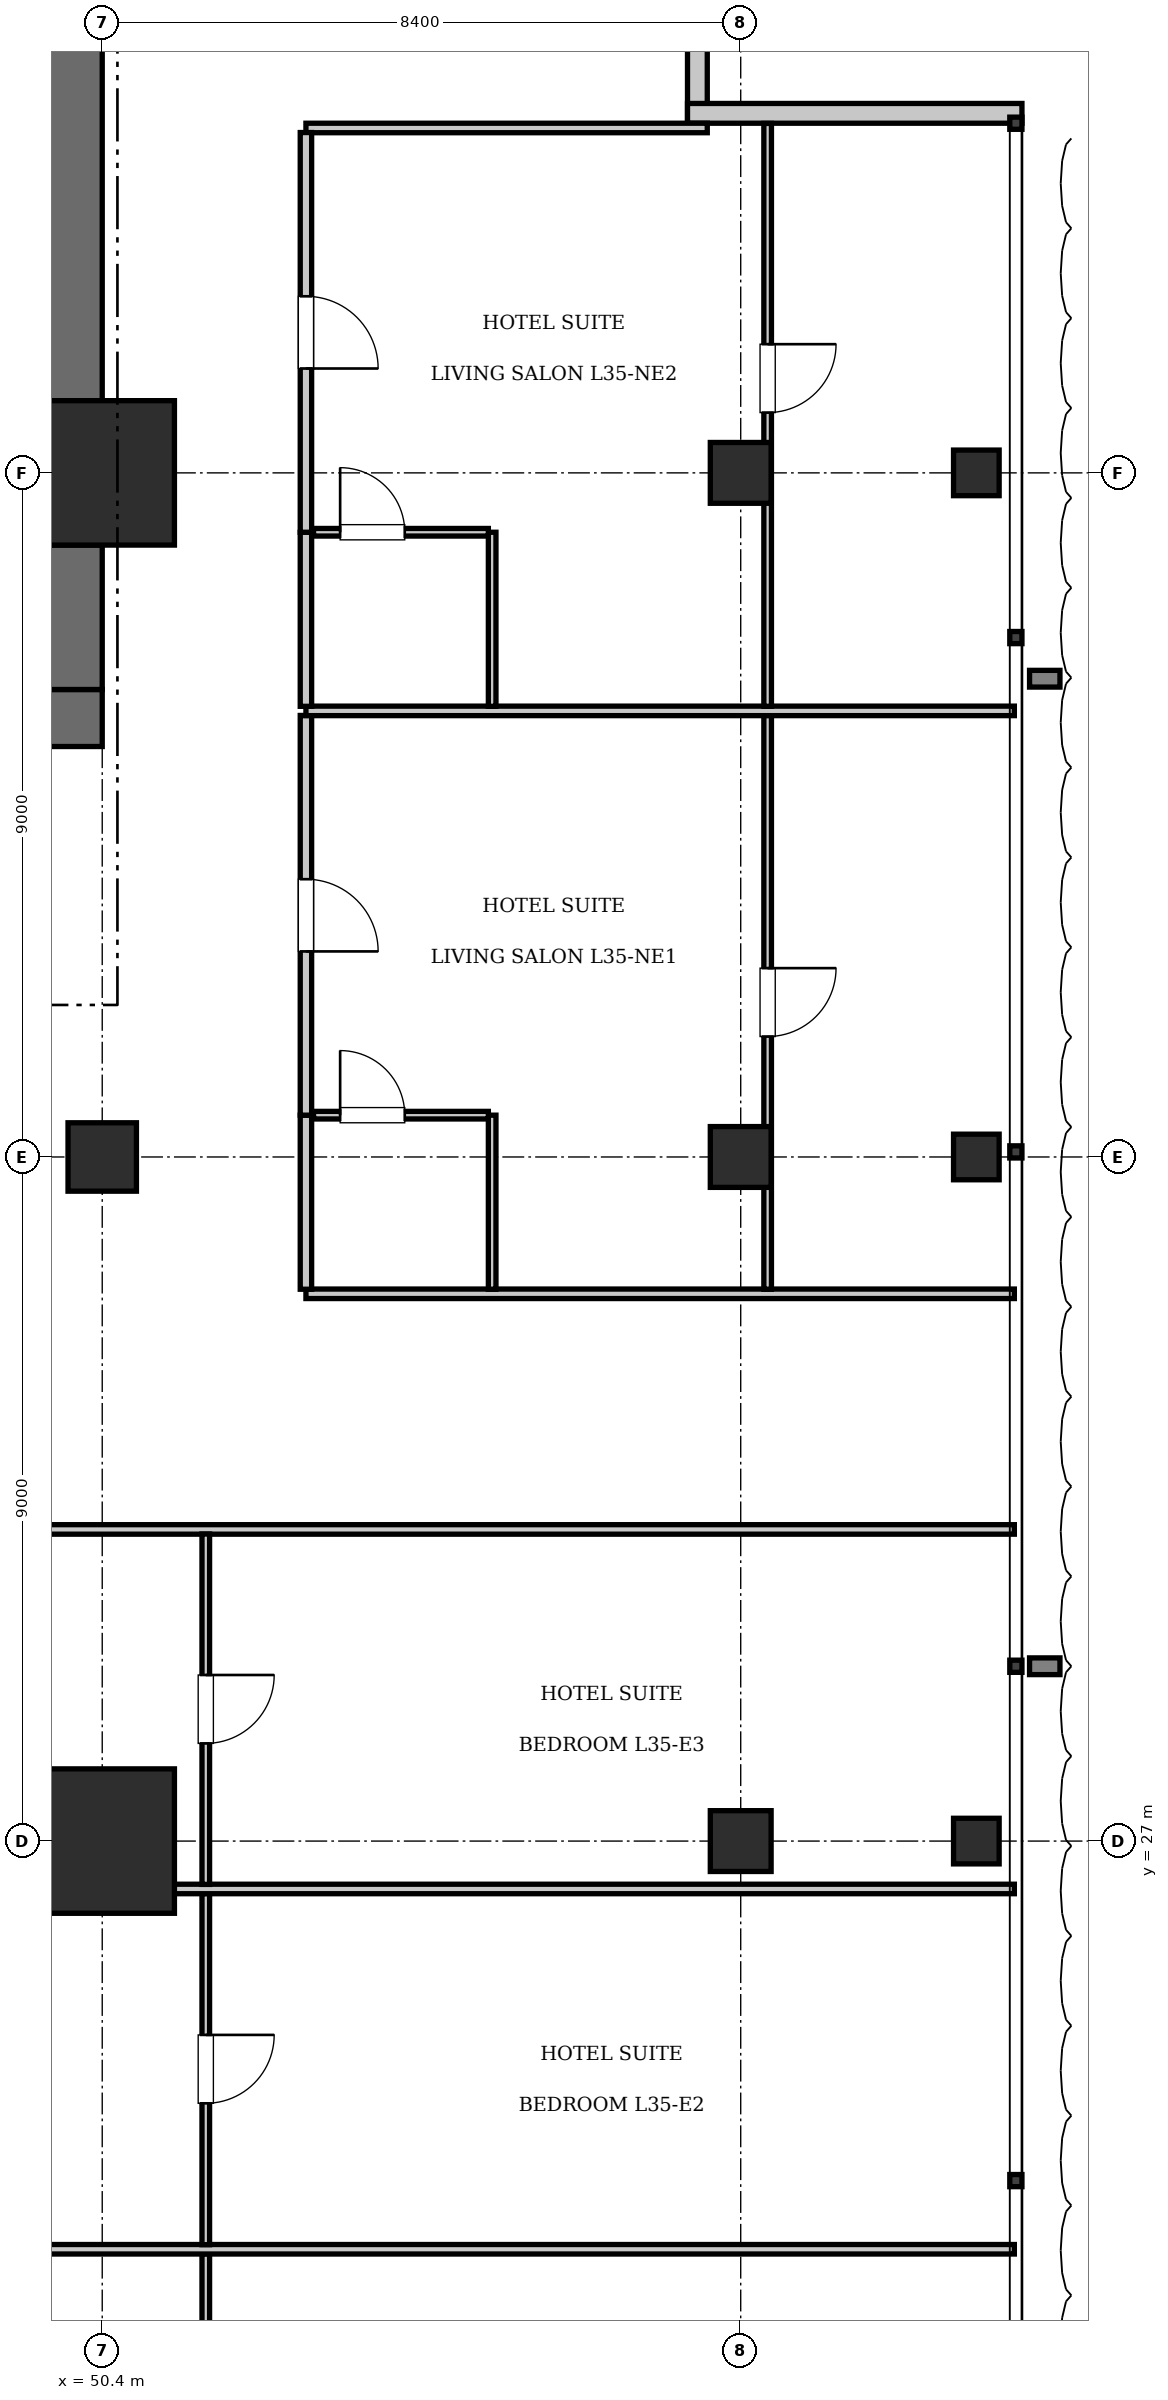
"""IFC4 building model, lengths in metres.
Left out: names, types, materials, properties, quantities, classifications, styles, units other than length and angle.
Written with IfcOpenShell. Run it as: python <this file> out.ifc"""

import sys

from ifc_helpers import new_model, si_unit, direction, frame, frame_2d, origin, origin_2d, place, context, subcontext, project, spatial, rectangle, i_section, extrude, element, fill, save


model = new_model("IFC4")
c1 = context("Model", 3, precision=1e-05, world=origin(), true_north=direction((0.0, 1.0)))
c2 = subcontext(c1, "Body", "Model", "MODEL_VIEW")
j1 = project(units=[si_unit("LENGTHUNIT", "METRE"), si_unit("PLANEANGLEUNIT", "RADIAN")], contexts=[c1])
p1 = place(None, origin())
s1 = spatial("IfcSite", under=j1, at=p1, CompositionType="ELEMENT")
p2 = place(p1, origin())
s2 = spatial("IfcBuilding", under=s1, at=p2, CompositionType="ELEMENT")
p3 = place(p2, frame((0.0, 0.0, 146.65)))
s3 = spatial("IfcBuildingStorey", under=s2, at=p3, CompositionType="ELEMENT", Elevation=146.65)
for number, where, z_axis, x_axis in (
    (1, (50.4, 27.0, 0.0), (0.0, 0.0, 1.0), (1.0, 0.0, 0.0)),
    (2, (50.4, 45.0, 0.0), (0.0, 0.0, 1.0), (1.0, 0.0, 0.0)),
):
    element("IfcColumn", number, at=place(p3, frame(where, z_axis=z_axis, x_axis=x_axis)), inside=s3, PredefinedType="COLUMN", context=c2, shape_type="SweptSolid", body=[
        extrude(rectangle(XDim=1.9, YDim=1.9, at=origin_2d()), origin(), (0.0, 0.0, 1.0), 3.85),
    ])
p4 = place(p3, frame((43.6, 41.775, 0.0), z_axis=(0.0, 0.0, 1.0), x_axis=(1.0, 0.0, 0.0)))
e3 = element("IfcWall", 3, at=p4, inside=s3, PredefinedType="SHEAR", context=c2, shape_type="SweptSolid", body=[
    extrude(rectangle(XDim=6.8, YDim=0.75, at=frame_2d((3.4, 0.0))), origin(), (0.0, 0.0, 1.0), 3.85),
])
p5 = place(p4, frame((3.9, 0.0, 0.0)))
e4 = element("IfcOpeningElement", 4, at=p5, cuts=e3, PredefinedType="OPENING", context=c2, shape_type="SweptSolid", body=[
    extrude(rectangle(XDim=1.15, YDim=2.15, at=frame_2d((0.575, 1.075))), frame((0.0, 0.385, 0.0), z_axis=(0.0, -1.0, 0.0), x_axis=(1.0, 0.0, 0.0)), (0.0, 0.0, 1.0), 0.77),
])
p6 = place(p4, frame((0.55, 0.0, 0.0)))
e5 = element("IfcOpeningElement", 5, at=p6, cuts=e3, PredefinedType="OPENING", context=c2, shape_type="SweptSolid", body=[
    extrude(rectangle(XDim=1.1, YDim=2.2, at=frame_2d((0.55, 1.1))), frame((0.0, 0.385, 0.0), z_axis=(0.0, -1.0, 0.0), x_axis=(1.0, 0.0, 0.0)), (0.0, 0.0, 1.0), 0.77),
])
p7 = place(p3, frame((50.025, 42.15, 0.0), z_axis=(0.0, 0.0, 1.0), x_axis=(0.0, 1.0, 0.0)))
e6 = element("IfcWall", 6, at=p7, inside=s3, PredefinedType="SHEAR", context=c2, shape_type="SweptSolid", body=[
    extrude(rectangle(XDim=1.9, YDim=0.75, at=frame_2d((0.95, 0.0))), origin(), (0.0, 0.0, 1.0), 3.85),
])
p8 = place(p3, frame((50.025, 45.95, 0.0), z_axis=(0.0, 0.0, 1.0), x_axis=(0.0, 1.0, 0.0)))
e7 = element("IfcWall", 7, at=p8, inside=s3, PredefinedType="SHEAR", context=c2, shape_type="SweptSolid", body=[
    extrude(rectangle(XDim=7.3, YDim=0.75, at=frame_2d((3.65, 0.0))), origin(), (0.0, 0.0, 1.0), 3.85),
])
p9 = place(p3, frame((50.4, 36.0, 0.0), z_axis=(0.0, 0.0, 1.0), x_axis=(1.0, 0.0, 0.0)))
e8 = element("IfcColumn", 8, at=p9, inside=s3, PredefinedType="COLUMN", context=c2, shape_type="SweptSolid", body=[
    extrude(rectangle(XDim=0.9, YDim=0.9, at=origin_2d()), origin(), (0.0, 0.0, 1.0), 3.85),
])
for number, where, z_axis, x_axis in (
    (9, (58.8, 27.0, 0.0), (0.0, 0.0, 1.0), (1.0, 0.0, 0.0)),
    (10, (58.8, 36.0, 0.0), (0.0, 0.0, 1.0), (1.0, 0.0, 0.0)),
    (11, (58.8, 45.0, 0.0), (0.0, 0.0, 1.0), (1.0, 0.0, 0.0)),
):
    element("IfcColumn", number, at=place(p3, frame(where, z_axis=z_axis, x_axis=x_axis)), inside=s3, PredefinedType="COLUMN", context=c2, shape_type="SweptSolid", body=[
        extrude(rectangle(XDim=0.8, YDim=0.8, at=origin_2d()), origin(), (0.0, 0.0, 1.0), 3.85),
    ])
for number, where, z_axis, x_axis in (
    (12, (61.9, 27.0, 0.0), (0.0, 0.0, 1.0), (1.0, 0.0, 0.0)),
    (13, (61.9, 36.0, 0.0), (0.0, 0.0, 1.0), (1.0, 0.0, 0.0)),
    (14, (61.9, 45.0, 0.0), (0.0, 0.0, 1.0), (1.0, 0.0, 0.0)),
):
    element("IfcColumn", number, at=place(p3, frame(where, z_axis=z_axis, x_axis=x_axis)), inside=s3, PredefinedType="COLUMN", context=c2, shape_type="SweptSolid", body=[
        extrude(i_section(OverallWidth=0.6, OverallDepth=0.6, WebThickness=0.025, FlangeThickness=0.038, at=origin_2d()), origin(), (0.0, 0.0, 1.0), 3.85),
    ])
for number, where, z_axis, x_axis in (
    (15, (58.23, 54.0, 0.0), (0.0, 0.0, 1.0), (0.0, -1.0, 0.0)),
    (16, (58.1, 49.73, 0.0), (0.0, 0.0, 1.0), (1.0, 0.0, 0.0)),
):
    element("IfcWall", number, at=place(p3, frame(where, z_axis=z_axis, x_axis=x_axis)), inside=s3, PredefinedType="SOLIDWALL", context=c2, shape_type="SweptSolid", body=[
        extrude(rectangle(XDim=4.4, YDim=0.26, at=frame_2d((2.2, 0.0))), origin(), (0.0, 0.0, 1.0), 3.61),
    ])
p10 = place(p3, frame((37.68, 31.1, 0.0), z_axis=(0.0, 0.0, 1.0), x_axis=(1.0, 0.0, 0.0)))
e17 = element("IfcWall", 17, at=p10, inside=s3, PredefinedType="PARTITIONING", context=c2, shape_type="SweptSolid", body=[
    extrude(rectangle(XDim=24.72, YDim=0.125, at=frame_2d((12.36, 0.0))), origin(), (0.0, 0.0, 1.0), 3.61),
])
p11 = place(p3, frame((51.762, 16.96, 0.0), z_axis=(0.0, 0.0, 1.0), x_axis=(0.0, 1.0, 0.0)))
e18 = element("IfcWall", 18, at=p11, inside=s3, PredefinedType="PARTITIONING", context=c2, shape_type="SweptSolid", body=[
    extrude(rectangle(XDim=4.61, YDim=0.1, at=frame_2d((2.305, 0.0))), origin(), (0.0, 0.0, 1.0), 3.61),
])
p12 = place(p11, frame((1.855, 0.0, 0.0)))
e19 = element("IfcOpeningElement", 19, at=p12, cuts=e18, PredefinedType="OPENING", context=c2, shape_type="SweptSolid", body=[
    extrude(rectangle(XDim=0.9, YDim=2.1, at=frame_2d((0.45, 1.05))), frame((0.0, 0.06, 0.0), z_axis=(0.0, -1.0, 0.0), x_axis=(1.0, 0.0, 0.0)), (0.0, 0.0, 1.0), 0.12),
])
p13 = place(p3, frame((37.68, 21.63, 0.0), z_axis=(0.0, 0.0, 1.0), x_axis=(1.0, 0.0, 0.0)))
e20 = element("IfcWall", 20, at=p13, inside=s3, PredefinedType="PARTITIONING", context=c2, shape_type="SweptSolid", body=[
    extrude(rectangle(XDim=24.72, YDim=0.125, at=frame_2d((12.36, 0.0))), origin(), (0.0, 0.0, 1.0), 3.61),
])
p14 = place(p3, frame((51.762, 21.69, 0.0), z_axis=(0.0, 0.0, 1.0), x_axis=(0.0, 1.0, 0.0)))
e21 = element("IfcWall", 21, at=p14, inside=s3, PredefinedType="PARTITIONING", context=c2, shape_type="SweptSolid", body=[
    extrude(rectangle(XDim=4.62, YDim=0.1, at=frame_2d((2.31, 0.0))), origin(), (0.0, 0.0, 1.0), 3.61),
])
p15 = place(p14, frame((1.86, 0.0, 0.0)))
e22 = element("IfcOpeningElement", 22, at=p15, cuts=e21, PredefinedType="OPENING", context=c2, shape_type="SweptSolid", body=[
    extrude(rectangle(XDim=0.9, YDim=2.1, at=frame_2d((0.45, 1.05))), frame((0.0, 0.06, 0.0), z_axis=(0.0, -1.0, 0.0), x_axis=(1.0, 0.0, 0.0)), (0.0, 0.0, 1.0), 0.12),
])
p16 = place(p3, frame((37.68, 26.37, 0.0), z_axis=(0.0, 0.0, 1.0), x_axis=(1.0, 0.0, 0.0)))
e23 = element("IfcWall", 23, at=p16, inside=s3, PredefinedType="PARTITIONING", context=c2, shape_type="SweptSolid", body=[
    extrude(rectangle(XDim=24.72, YDim=0.125, at=frame_2d((12.36, 0.0))), origin(), (0.0, 0.0, 1.0), 3.61),
])
p17 = place(p3, frame((51.762, 26.43, 0.0), z_axis=(0.0, 0.0, 1.0), x_axis=(0.0, 1.0, 0.0)))
e24 = element("IfcWall", 24, at=p17, inside=s3, PredefinedType="PARTITIONING", context=c2, shape_type="SweptSolid", body=[
    extrude(rectangle(XDim=4.61, YDim=0.1, at=frame_2d((2.305, 0.0))), origin(), (0.0, 0.0, 1.0), 3.61),
])
p18 = place(p17, frame((1.855, 0.0, 0.0)))
e25 = element("IfcOpeningElement", 25, at=p18, cuts=e24, PredefinedType="OPENING", context=c2, shape_type="SweptSolid", body=[
    extrude(rectangle(XDim=0.9, YDim=2.1, at=frame_2d((0.45, 1.05))), frame((0.0, 0.06, 0.0), z_axis=(0.0, -1.0, 0.0), x_axis=(1.0, 0.0, 0.0)), (0.0, 0.0, 1.0), 0.12),
])
p19 = place(p3, frame((53.08, 34.2, 0.0), z_axis=(0.0, 0.0, 1.0), x_axis=(1.0, 0.0, 0.0)))
e26 = element("IfcWall", 26, at=p19, inside=s3, PredefinedType="PARTITIONING", context=c2, shape_type="SweptSolid", body=[
    extrude(rectangle(XDim=9.32, YDim=0.125, at=frame_2d((4.66, 0.0))), origin(), (0.0, 0.0, 1.0), 3.61),
])
p20 = place(p3, frame((53.08, 49.538, 0.0), z_axis=(0.0, 0.0, 1.0), x_axis=(1.0, 0.0, 0.0)))
e27 = element("IfcWall", 27, at=p20, inside=s3, PredefinedType="PARTITIONING", context=c2, shape_type="SweptSolid", body=[
    extrude(rectangle(XDim=5.28, YDim=0.125, at=frame_2d((2.64, 0.0))), origin(), (0.0, 0.0, 1.0), 3.61),
])
p21 = place(p3, frame((53.08, 34.26, 0.0), z_axis=(0.0, 0.0, 1.0), x_axis=(0.0, 1.0, 0.0)))
e28 = element("IfcWall", 28, at=p21, inside=s3, PredefinedType="PARTITIONING", context=c2, shape_type="SweptSolid", body=[
    extrude(rectangle(XDim=2.29, YDim=0.15, at=frame_2d((1.145, 0.0))), origin(), (0.0, 0.0, 1.0), 3.61),
])
p22 = place(p3, frame((53.08, 36.55, 0.0), z_axis=(0.0, 0.0, 1.0), x_axis=(0.0, 1.0, 0.0)))
e29 = element("IfcWall", 29, at=p22, inside=s3, PredefinedType="PARTITIONING", context=c2, shape_type="SweptSolid", body=[
    extrude(rectangle(XDim=5.259, YDim=0.15, at=frame_2d((2.629, 0.0))), origin(), (0.0, 0.0, 1.0), 3.61),
])
p23 = place(p22, frame((2.154, 0.0, 0.0)))
e30 = element("IfcOpeningElement", 30, at=p23, cuts=e29, PredefinedType="OPENING", context=c2, shape_type="SweptSolid", body=[
    extrude(rectangle(XDim=0.95, YDim=2.15, at=frame_2d((0.475, 1.075))), frame((0.0, 0.085, 0.0), z_axis=(0.0, -1.0, 0.0), x_axis=(1.0, 0.0, 0.0)), (0.0, 0.0, 1.0), 0.17),
])
p24 = place(p3, frame((55.53, 34.26, 0.0), z_axis=(0.0, 0.0, 1.0), x_axis=(0.0, 1.0, 0.0)))
e31 = element("IfcWall", 31, at=p24, inside=s3, PredefinedType="PARTITIONING", context=c2, shape_type="SweptSolid", body=[
    extrude(rectangle(XDim=2.29, YDim=0.1, at=frame_2d((1.145, 0.0))), origin(), (0.0, 0.0, 1.0), 3.61),
])
p25 = place(p3, frame((53.18, 36.55, 0.0), z_axis=(0.0, 0.0, 1.0), x_axis=(1.0, 0.0, 0.0)))
e32 = element("IfcWall", 32, at=p25, inside=s3, PredefinedType="PARTITIONING", context=c2, shape_type="SweptSolid", body=[
    extrude(rectangle(XDim=2.3, YDim=0.1, at=frame_2d((1.15, 0.0))), origin(), (0.0, 0.0, 1.0), 3.61),
])
p26 = place(p25, frame((0.35, 0.0, 0.0)))
e33 = element("IfcOpeningElement", 33, at=p26, cuts=e32, PredefinedType="OPENING", context=c2, shape_type="SweptSolid", body=[
    extrude(rectangle(XDim=0.85, YDim=2.1, at=frame_2d((0.425, 1.05))), frame((0.0, 0.06, 0.0), z_axis=(0.0, -1.0, 0.0), x_axis=(1.0, 0.0, 0.0)), (0.0, 0.0, 1.0), 0.12),
])
p27 = place(p3, frame((59.154, 34.26, 0.0), z_axis=(0.0, 0.0, 1.0), x_axis=(0.0, 1.0, 0.0)))
e34 = element("IfcWall", 34, at=p27, inside=s3, PredefinedType="PARTITIONING", context=c2, shape_type="SweptSolid", body=[
    extrude(rectangle(XDim=7.549, YDim=0.1, at=frame_2d((3.774, 0.0))), origin(), (0.0, 0.0, 1.0), 3.61),
])
p28 = place(p27, frame((3.324, 0.0, 0.0)))
e35 = element("IfcOpeningElement", 35, at=p28, cuts=e34, PredefinedType="OPENING", context=c2, shape_type="SweptSolid", body=[
    extrude(rectangle(XDim=0.9, YDim=2.1, at=frame_2d((0.45, 1.05))), frame((0.0, 0.06, 0.0), z_axis=(0.0, -1.0, 0.0), x_axis=(1.0, 0.0, 0.0)), (0.0, 0.0, 1.0), 0.12),
])
p29 = place(p3, frame((53.08, 41.869, 0.0), z_axis=(0.0, 0.0, 1.0), x_axis=(1.0, 0.0, 0.0)))
e36 = element("IfcWall", 36, at=p29, inside=s3, PredefinedType="PARTITIONING", context=c2, shape_type="SweptSolid", body=[
    extrude(rectangle(XDim=9.32, YDim=0.125, at=frame_2d((4.66, 0.0))), origin(), (0.0, 0.0, 1.0), 3.61),
])
p30 = place(p3, frame((53.08, 41.929, 0.0), z_axis=(0.0, 0.0, 1.0), x_axis=(0.0, 1.0, 0.0)))
e37 = element("IfcWall", 37, at=p30, inside=s3, PredefinedType="PARTITIONING", context=c2, shape_type="SweptSolid", body=[
    extrude(rectangle(XDim=2.29, YDim=0.15, at=frame_2d((1.145, 0.0))), origin(), (0.0, 0.0, 1.0), 3.61),
])
p31 = place(p3, frame((53.08, 44.219, 0.0), z_axis=(0.0, 0.0, 1.0), x_axis=(0.0, 1.0, 0.0)))
e38 = element("IfcWall", 38, at=p31, inside=s3, PredefinedType="PARTITIONING", context=c2, shape_type="SweptSolid", body=[
    extrude(rectangle(XDim=5.259, YDim=0.15, at=frame_2d((2.629, 0.0))), origin(), (0.0, 0.0, 1.0), 3.61),
])
p32 = place(p31, frame((2.154, 0.0, 0.0)))
e39 = element("IfcOpeningElement", 39, at=p32, cuts=e38, PredefinedType="OPENING", context=c2, shape_type="SweptSolid", body=[
    extrude(rectangle(XDim=0.95, YDim=2.15, at=frame_2d((0.475, 1.075))), frame((0.0, 0.085, 0.0), z_axis=(0.0, -1.0, 0.0), x_axis=(1.0, 0.0, 0.0)), (0.0, 0.0, 1.0), 0.17),
])
p33 = place(p3, frame((55.53, 41.929, 0.0), z_axis=(0.0, 0.0, 1.0), x_axis=(0.0, 1.0, 0.0)))
e40 = element("IfcWall", 40, at=p33, inside=s3, PredefinedType="PARTITIONING", context=c2, shape_type="SweptSolid", body=[
    extrude(rectangle(XDim=2.29, YDim=0.1, at=frame_2d((1.145, 0.0))), origin(), (0.0, 0.0, 1.0), 3.61),
])
p34 = place(p3, frame((53.18, 44.219, 0.0), z_axis=(0.0, 0.0, 1.0), x_axis=(1.0, 0.0, 0.0)))
e41 = element("IfcWall", 41, at=p34, inside=s3, PredefinedType="PARTITIONING", context=c2, shape_type="SweptSolid", body=[
    extrude(rectangle(XDim=2.3, YDim=0.1, at=frame_2d((1.15, 0.0))), origin(), (0.0, 0.0, 1.0), 3.61),
])
p35 = place(p34, frame((0.35, 0.0, 0.0)))
e42 = element("IfcOpeningElement", 42, at=p35, cuts=e41, PredefinedType="OPENING", context=c2, shape_type="SweptSolid", body=[
    extrude(rectangle(XDim=0.85, YDim=2.1, at=frame_2d((0.425, 1.05))), frame((0.0, 0.06, 0.0), z_axis=(0.0, -1.0, 0.0), x_axis=(1.0, 0.0, 0.0)), (0.0, 0.0, 1.0), 0.12),
])
p36 = place(p3, frame((59.154, 41.929, 0.0), z_axis=(0.0, 0.0, 1.0), x_axis=(0.0, 1.0, 0.0)))
e43 = element("IfcWall", 43, at=p36, inside=s3, PredefinedType="PARTITIONING", context=c2, shape_type="SweptSolid", body=[
    extrude(rectangle(XDim=7.669, YDim=0.1, at=frame_2d((3.834, 0.0))), origin(), (0.0, 0.0, 1.0), 3.61),
])
p37 = place(p36, frame((3.864, 0.0, 0.0)))
e44 = element("IfcOpeningElement", 44, at=p37, cuts=e43, PredefinedType="OPENING", context=c2, shape_type="SweptSolid", body=[
    extrude(rectangle(XDim=0.9, YDim=2.1, at=frame_2d((0.45, 1.05))), frame((0.0, 0.06, 0.0), z_axis=(0.0, -1.0, 0.0), x_axis=(1.0, 0.0, 0.0)), (0.0, 0.0, 1.0), 0.12),
])
p38 = place(p15, frame((0.9, 0.0, 0.0), z_axis=(0.0, 0.0, 1.0), x_axis=(-1.0, 0.0, 0.0)))
e45 = element("IfcDoor", 45, at=p38, inside=s3, OperationType="SINGLE_SWING_LEFT", PredefinedType="DOOR", context=c2, shape_type="SweptSolid", body=[
    extrude(rectangle(XDim=0.9, YDim=2.1, at=frame_2d((0.45, 1.05))), frame((0.0, 0.025, 0.0), z_axis=(0.0, -1.0, 0.0), x_axis=(1.0, 0.0, 0.0)), (0.0, 0.0, 1.0), 0.05),
])
fill(e22, e45)
p39 = place(p18, frame((0.9, 0.0, 0.0), z_axis=(0.0, 0.0, 1.0), x_axis=(-1.0, 0.0, 0.0)))
e46 = element("IfcDoor", 46, at=p39, inside=s3, OperationType="SINGLE_SWING_LEFT", PredefinedType="DOOR", context=c2, shape_type="SweptSolid", body=[
    extrude(rectangle(XDim=0.9, YDim=2.1, at=frame_2d((0.45, 1.05))), frame((0.0, 0.025, 0.0), z_axis=(0.0, -1.0, 0.0), x_axis=(1.0, 0.0, 0.0)), (0.0, 0.0, 1.0), 0.05),
])
fill(e25, e46)
p40 = place(p26, origin())
e47 = element("IfcDoor", 47, at=p40, inside=s3, OperationType="SINGLE_SWING_LEFT", PredefinedType="DOOR", context=c2, shape_type="SweptSolid", body=[
    extrude(rectangle(XDim=0.85, YDim=2.1, at=frame_2d((0.425, 1.05))), frame((0.0, 0.025, 0.0), z_axis=(0.0, -1.0, 0.0), x_axis=(1.0, 0.0, 0.0)), (0.0, 0.0, 1.0), 0.05),
])
fill(e33, e47)
p41 = place(p23, frame((0.95, 0.0, 0.0), z_axis=(0.0, 0.0, 1.0), x_axis=(-1.0, 0.0, 0.0)))
e48 = element("IfcDoor", 48, at=p41, inside=s3, OperationType="SINGLE_SWING_RIGHT", PredefinedType="DOOR", context=c2, shape_type="SweptSolid", body=[
    extrude(rectangle(XDim=0.95, YDim=2.15, at=frame_2d((0.475, 1.075))), frame((0.0, 0.025, 0.0), z_axis=(0.0, -1.0, 0.0), x_axis=(1.0, 0.0, 0.0)), (0.0, 0.0, 1.0), 0.05),
])
fill(e30, e48)
p42 = place(p28, frame((0.9, 0.0, 0.0), z_axis=(0.0, 0.0, 1.0), x_axis=(-1.0, 0.0, 0.0)))
e49 = element("IfcDoor", 49, at=p42, inside=s3, OperationType="SINGLE_SWING_LEFT", PredefinedType="DOOR", context=c2, shape_type="SweptSolid", body=[
    extrude(rectangle(XDim=0.9, YDim=2.1, at=frame_2d((0.45, 1.05))), frame((0.0, 0.025, 0.0), z_axis=(0.0, -1.0, 0.0), x_axis=(1.0, 0.0, 0.0)), (0.0, 0.0, 1.0), 0.05),
])
fill(e35, e49)
p43 = place(p35, origin())
e50 = element("IfcDoor", 50, at=p43, inside=s3, OperationType="SINGLE_SWING_LEFT", PredefinedType="DOOR", context=c2, shape_type="SweptSolid", body=[
    extrude(rectangle(XDim=0.85, YDim=2.1, at=frame_2d((0.425, 1.05))), frame((0.0, 0.025, 0.0), z_axis=(0.0, -1.0, 0.0), x_axis=(1.0, 0.0, 0.0)), (0.0, 0.0, 1.0), 0.05),
])
fill(e42, e50)
p44 = place(p32, frame((0.95, 0.0, 0.0), z_axis=(0.0, 0.0, 1.0), x_axis=(-1.0, 0.0, 0.0)))
e51 = element("IfcDoor", 51, at=p44, inside=s3, OperationType="SINGLE_SWING_RIGHT", PredefinedType="DOOR", context=c2, shape_type="SweptSolid", body=[
    extrude(rectangle(XDim=0.95, YDim=2.15, at=frame_2d((0.475, 1.075))), frame((0.0, 0.025, 0.0), z_axis=(0.0, -1.0, 0.0), x_axis=(1.0, 0.0, 0.0)), (0.0, 0.0, 1.0), 0.05),
])
fill(e39, e51)
p45 = place(p37, frame((0.9, 0.0, 0.0), z_axis=(0.0, 0.0, 1.0), x_axis=(-1.0, 0.0, 0.0)))
e52 = element("IfcDoor", 52, at=p45, inside=s3, OperationType="SINGLE_SWING_LEFT", PredefinedType="DOOR", context=c2, shape_type="SweptSolid", body=[
    extrude(rectangle(XDim=0.9, YDim=2.1, at=frame_2d((0.45, 1.05))), frame((0.0, 0.025, 0.0), z_axis=(0.0, -1.0, 0.0), x_axis=(1.0, 0.0, 0.0)), (0.0, 0.0, 1.0), 0.05),
])
fill(e44, e52)
save(model, sys.argv[1])
